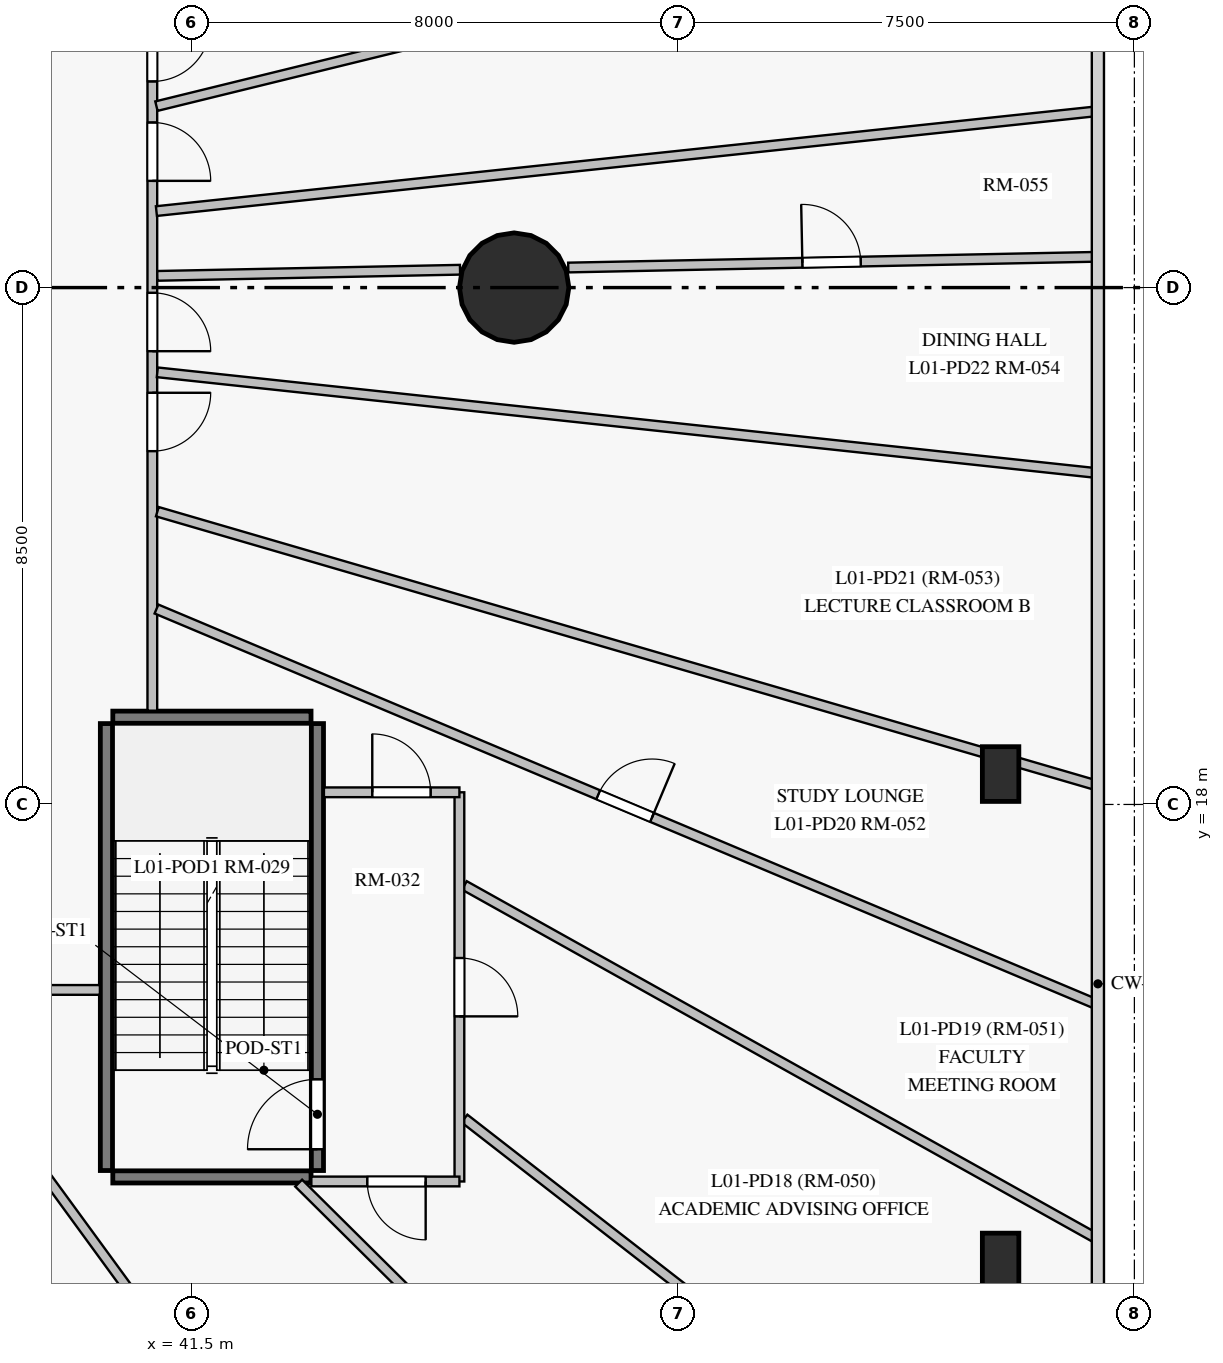
"""IFC4 building model, lengths in metres.
Left out: names, types, materials, properties, quantities, classifications, styles, units other than length and angle.
Written with IfcOpenShell. Run it as: python <this file> out.ifc"""

import sys

from ifc_helpers import new_model, si_unit, direction, frame, frame_2d, origin, origin_with_axes, origin_2d, place, context, subcontext, project, spatial, rectangle, circle, extrude, source, transform, mapped, element, fill, save


model = new_model("IFC4")
c1 = context("Model", 3, precision=1e-05, world=origin(), true_north=direction((0.0, 1.0)))
c2 = subcontext(c1, "Body", "Model", "MODEL_VIEW")
j1 = project(units=[si_unit("LENGTHUNIT", "METRE"), si_unit("PLANEANGLEUNIT", "RADIAN")], contexts=[c1])
p1 = place(None, origin())
s1 = spatial("IfcSite", under=j1, at=p1, CompositionType="ELEMENT")
p2 = place(p1, origin())
s2 = spatial("IfcBuilding", under=s1, at=p2, CompositionType="ELEMENT")
p3 = place(p2, frame((0.0, 0.0, 4.5)))
s3 = spatial("IfcBuildingStorey", under=s2, at=p3, CompositionType="ELEMENT", Elevation=4.5)
m1 = source(origin_with_axes(), c2, "Body", "SweptSolid", [
    extrude(circle(Radius=0.9, at=origin_2d()), origin(), (0.0, 0.0, 1.0), 4.5),
])
p4 = place(p3, frame((46.8, 26.5, 0.0), z_axis=(0.0, 0.0, 1.0), x_axis=(1.0, 0.0, 0.0)))
e1 = element("IfcColumn", 1, at=p4, inside=s3, PredefinedType="COLUMN", context=c2, shape_type="MappedRepresentation", body=[
    mapped(m1, transform((0.0, 0.0, 0.0), scale=1.0)),
])
m2 = source(origin_with_axes(), c2, "Body", "SweptSolid", [
    extrude(rectangle(XDim=0.6, YDim=0.9, at=origin_2d()), origin(), (0.0, 0.0, 1.0), 4.5),
])
for number, where, z_axis, x_axis in (
    (2, (54.8, 10.5, 0.0), (0.0, 0.0, 1.0), (1.0, 0.0, 0.0)),
    (3, (54.8, 18.5, 0.0), (0.0, 0.0, 1.0), (1.0, 0.0, 0.0)),
):
    element("IfcColumn", number, at=place(p3, frame(where, z_axis=z_axis, x_axis=x_axis)), inside=s3, PredefinedType="PILASTER", context=c2, shape_type="MappedRepresentation", body=[
        mapped(m2, transform((0.0, 0.0, 0.0), scale=1.0)),
    ])
p5 = place(p3, frame((40.095, 11.98, 0.0), z_axis=(0.0, 0.0, 1.0), x_axis=(0.0, 1.0, 0.0)))
e4 = element("IfcWall", 4, at=p5, inside=s3, PredefinedType="SHEAR", context=c2, shape_type="SweptSolid", body=[
    extrude(rectangle(XDim=7.35, YDim=0.2, at=frame_2d((3.675, 0.0))), origin(), (0.0, 0.0, 1.0), 4.2),
])
p6 = place(p3, frame((43.565, 11.98, 0.0), z_axis=(0.0, 0.0, 1.0), x_axis=(0.0, 1.0, 0.0)))
e5 = element("IfcWall", 5, at=p6, inside=s3, PredefinedType="SHEAR", context=c2, shape_type="SweptSolid", body=[
    extrude(rectangle(XDim=7.35, YDim=0.2, at=frame_2d((3.675, 0.0))), origin(), (0.0, 0.0, 1.0), 4.2),
])
p7 = place(p6, frame((0.35, 0.0, 0.0)))
e6 = element("IfcOpeningElement", 6, at=p7, cuts=e5, PredefinedType="OPENING", context=c2, shape_type="SweptSolid", body=[
    extrude(rectangle(XDim=1.15, YDim=2.15, at=frame_2d((0.575, 1.075))), frame((0.0, 0.11, 0.0), z_axis=(0.0, -1.0, 0.0), x_axis=(1.0, 0.0, 0.0)), (0.0, 0.0, 1.0), 0.22),
])
for number, where, z_axis, x_axis in (
    (7, (40.2, 11.875, 0.0), (0.0, 0.0, 1.0), (1.0, 0.0, 0.0)),
    (8, (40.2, 19.435, 0.0), (0.0, 0.0, 1.0), (1.0, 0.0, 0.0)),
):
    element("IfcWall", number, at=place(p3, frame(where, z_axis=z_axis, x_axis=x_axis)), inside=s3, PredefinedType="SHEAR", context=c2, shape_type="SweptSolid", body=[
        extrude(rectangle(XDim=3.26, YDim=0.2, at=frame_2d((1.63, 0.0))), origin(), (0.0, 0.0, 1.0), 4.2),
    ])
p8 = place(p3, frame((40.85, 38.05, 0.0), z_axis=(0.0, 0.0, 1.0), x_axis=(0.0, -1.0, 0.0)))
e9 = element("IfcWall", 9, at=p8, inside=s3, PredefinedType="PARTITIONING", context=c2, shape_type="SweptSolid", body=[
    extrude(rectangle(XDim=18.508, YDim=0.16, at=frame_2d((9.254, 0.0))), origin(), (0.0, 0.0, 1.0), 3.25),
])
p9 = place(p8, frame((13.28, 0.0, 0.0)))
e10 = element("IfcOpeningElement", 10, at=p9, cuts=e9, PredefinedType="OPENING", context=c2, shape_type="SweptSolid", body=[
    extrude(rectangle(XDim=0.96, YDim=2.15, at=frame_2d((0.48, 1.075))), frame((0.0, 0.09, 0.0), z_axis=(0.0, -1.0, 0.0), x_axis=(1.0, 0.0, 0.0)), (0.0, 0.0, 1.0), 0.18),
])
p10 = place(p8, frame((11.636, 0.0, 0.0)))
e11 = element("IfcOpeningElement", 11, at=p10, cuts=e9, PredefinedType="OPENING", context=c2, shape_type="SweptSolid", body=[
    extrude(rectangle(XDim=0.96, YDim=2.15, at=frame_2d((0.48, 1.075))), frame((0.0, 0.09, 0.0), z_axis=(0.0, -1.0, 0.0), x_axis=(1.0, 0.0, 0.0)), (0.0, 0.0, 1.0), 0.18),
])
p11 = place(p8, frame((8.835, 0.0, 0.0)))
e12 = element("IfcOpeningElement", 12, at=p11, cuts=e9, PredefinedType="OPENING", context=c2, shape_type="SweptSolid", body=[
    extrude(rectangle(XDim=0.96, YDim=2.15, at=frame_2d((0.48, 1.075))), frame((0.0, 0.09, 0.0), z_axis=(0.0, -1.0, 0.0), x_axis=(1.0, 0.0, 0.0)), (0.0, 0.0, 1.0), 0.18),
])
p12 = place(p8, frame((6.084, 0.0, 0.0)))
e13 = element("IfcOpeningElement", 13, at=p12, cuts=e9, PredefinedType="OPENING", context=c2, shape_type="SweptSolid", body=[
    extrude(rectangle(XDim=0.96, YDim=2.15, at=frame_2d((0.48, 1.075))), frame((0.0, 0.09, 0.0), z_axis=(0.0, -1.0, 0.0), x_axis=(1.0, 0.0, 0.0)), (0.0, 0.0, 1.0), 0.18),
])
p13 = place(p8, frame((7.2, 0.0, 0.0)))
e14 = element("IfcOpeningElement", 14, at=p13, cuts=e9, PredefinedType="OPENING", context=c2, shape_type="SweptSolid", body=[
    extrude(rectangle(XDim=0.96, YDim=2.15, at=frame_2d((0.48, 1.075))), frame((0.0, 0.09, 0.0), z_axis=(0.0, -1.0, 0.0), x_axis=(1.0, 0.0, 0.0)), (0.0, 0.0, 1.0), 0.18),
])
p14 = place(p8, frame((2.446, 0.0, 0.0)))
e15 = element("IfcOpeningElement", 15, at=p14, cuts=e9, PredefinedType="OPENING", context=c2, shape_type="SweptSolid", body=[
    extrude(rectangle(XDim=0.86, YDim=2.04, at=frame_2d((0.43, 1.02))), frame((0.0, 0.09, 0.0), z_axis=(0.0, -1.0, 0.0), x_axis=(1.0, 0.0, 0.0)), (0.0, 0.0, 1.0), 0.18),
])
p15 = place(p8, frame((1.037, 0.0, 0.0)))
e16 = element("IfcOpeningElement", 16, at=p15, cuts=e9, PredefinedType="OPENING", context=c2, shape_type="SweptSolid", body=[
    extrude(rectangle(XDim=0.86, YDim=2.04, at=frame_2d((0.43, 1.02))), frame((0.0, 0.09, 0.0), z_axis=(0.0, -1.0, 0.0), x_axis=(1.0, 0.0, 0.0)), (0.0, 0.0, 1.0), 0.18),
])
p16 = place(p3, frame((40.918, 21.214, 0.0), z_axis=(0.0, 0.0, 1.0), x_axis=(0.921837584327, -0.387576402947, 0.0)))
e17 = element("IfcWall", 17, at=p16, inside=s3, PredefinedType="PARTITIONING", context=c2, shape_type="SweptSolid", body=[
    extrude(rectangle(XDim=16.762, YDim=0.16, at=frame_2d((8.381, 0.0))), origin(), (0.0, 0.0, 1.0), 4.2),
])
p17 = place(p16, frame((7.881, 0.0, 0.0)))
e18 = element("IfcOpeningElement", 18, at=p17, cuts=e17, PredefinedType="OPENING", context=c2, shape_type="SweptSolid", body=[
    extrude(rectangle(XDim=0.96, YDim=2.15, at=frame_2d((0.48, 1.075))), frame((0.0, 0.09, 0.0), z_axis=(0.0, -1.0, 0.0), x_axis=(1.0, 0.0, 0.0)), (0.0, 0.0, 1.0), 0.18),
])
p18 = place(p3, frame((40.932, 22.815, 0.0), z_axis=(0.0, 0.0, 1.0), x_axis=(0.960065941078, -0.279773817185, 0.0)))
e19 = element("IfcWall", 19, at=p18, inside=s3, PredefinedType="PARTITIONING", context=c2, shape_type="SweptSolid", body=[
    extrude(rectangle(XDim=16.083, YDim=0.16, at=frame_2d((8.042, 0.0))), origin(), (0.0, 0.0, 1.0), 3.7),
])
p19 = place(p3, frame((40.917, 29.484, 0.0), z_axis=(0.0, 0.0, 1.0), x_axis=(0.97121044227, 0.238223166012, 0.0)))
e20 = element("IfcWall", 20, at=p19, inside=s3, PredefinedType="PARTITIONING", context=c2, shape_type="SweptSolid", body=[
    extrude(rectangle(XDim=15.914, YDim=0.16, at=frame_2d((7.957, 0.0))), origin(), (0.0, 0.0, 1.0), 3.7),
])
p20 = place(p3, frame((40.932, 25.107, 0.0), z_axis=(0.0, 0.0, 1.0), x_axis=(0.994299337465, -0.106624704062, 0.0)))
e21 = element("IfcWall", 21, at=p20, inside=s3, PredefinedType="PARTITIONING", context=c2, shape_type="SweptSolid", body=[
    extrude(rectangle(XDim=15.531, YDim=0.16, at=frame_2d((7.766, 0.0))), origin(), (0.0, 0.0, 1.0), 3.7),
])
p21 = place(p3, frame((40.917, 27.758, 0.0), z_axis=(0.0, 0.0, 1.0), x_axis=(0.994413071603, 0.10555871838, 0.0)))
e22 = element("IfcWall", 22, at=p21, inside=s3, PredefinedType="PARTITIONING", context=c2, shape_type="SweptSolid", body=[
    extrude(rectangle(XDim=15.545, YDim=0.16, at=frame_2d((7.772, 0.0))), origin(), (0.0, 0.0, 1.0), 3.7),
])
p22 = place(p3, frame((36.923, 14.868, 0.0), z_axis=(0.0, 0.0, 1.0), x_axis=(0.589855025389, -0.80750916343, 0.0)))
e23 = element("IfcWall", 23, at=p22, inside=s3, PredefinedType="PARTITIONING", context=c2, shape_type="SweptSolid", body=[
    extrude(rectangle(XDim=15.27, YDim=0.16, at=frame_2d((7.635, 0.0))), origin(), (0.0, 0.0, 1.0), 4.2),
])
p23 = place(p22, frame((7.142, 0.0, 0.0)))
e24 = element("IfcOpeningElement", 24, at=p23, cuts=e23, PredefinedType="OPENING", context=c2, shape_type="SweptSolid", body=[
    extrude(rectangle(XDim=0.96, YDim=2.15, at=frame_2d((0.48, 1.075))), frame((0.0, 0.09, 0.0), z_axis=(0.0, -1.0, 0.0), x_axis=(1.0, 0.0, 0.0)), (0.0, 0.0, 1.0), 0.18),
])
p24 = place(p3, frame((35.674, 14.868, 0.0), z_axis=(0.0, 0.0, 1.0), x_axis=(0.528650980247, -0.848839290492, 0.0)))
e25 = element("IfcWall", 25, at=p24, inside=s3, PredefinedType="PARTITIONING", context=c2, shape_type="SweptSolid", body=[
    extrude(rectangle(XDim=14.529, YDim=0.16, at=frame_2d((7.265, 0.0))), origin(), (0.0, 0.0, 1.0), 4.2),
])
p25 = place(p24, frame((6.835, 0.0, 0.0)))
e26 = element("IfcOpeningElement", 26, at=p25, cuts=e25, PredefinedType="OPENING", context=c2, shape_type="SweptSolid", body=[
    extrude(rectangle(XDim=0.86, YDim=2.04, at=frame_2d((0.43, 1.02))), frame((0.0, 0.09, 0.0), z_axis=(0.0, -1.0, 0.0), x_axis=(1.0, 0.0, 0.0)), (0.0, 0.0, 1.0), 0.18),
])
p26 = place(p3, frame((39.988, 14.95, 0.0), z_axis=(0.0, 0.0, 1.0), x_axis=(-1.0, 0.0, 0.0)))
e27 = element("IfcWall", 27, at=p26, inside=s3, PredefinedType="PARTITIONING", context=c2, shape_type="SweptSolid", body=[
    extrude(rectangle(XDim=14.588, YDim=0.16, at=frame_2d((7.294, 0.0))), origin(), (0.0, 0.0, 1.0), 4.2),
])
p27 = place(p26, frame((10.34, 0.0, 0.0)))
e28 = element("IfcOpeningElement", 28, at=p27, cuts=e27, PredefinedType="OPENING", context=c2, shape_type="SweptSolid", body=[
    extrude(rectangle(XDim=0.96, YDim=2.15, at=frame_2d((0.48, 1.075))), frame((0.0, 0.09, 0.0), z_axis=(0.0, -1.0, 0.0), x_axis=(1.0, 0.0, 0.0)), (0.0, 0.0, 1.0), 0.18),
])
p28 = place(p26, frame((7.808, 0.0, 0.0)))
e29 = element("IfcOpeningElement", 29, at=p28, cuts=e27, PredefinedType="OPENING", context=c2, shape_type="SweptSolid", body=[
    extrude(rectangle(XDim=0.96, YDim=2.15, at=frame_2d((0.48, 1.075))), frame((0.0, 0.09, 0.0), z_axis=(0.0, -1.0, 0.0), x_axis=(1.0, 0.0, 0.0)), (0.0, 0.0, 1.0), 0.18),
])
p29 = place(p26, frame((6.145, 0.0, 0.0)))
e30 = element("IfcOpeningElement", 30, at=p29, cuts=e27, PredefinedType="OPENING", context=c2, shape_type="SweptSolid", body=[
    extrude(rectangle(XDim=0.96, YDim=2.15, at=frame_2d((0.48, 1.075))), frame((0.0, 0.09, 0.0), z_axis=(0.0, -1.0, 0.0), x_axis=(1.0, 0.0, 0.0)), (0.0, 0.0, 1.0), 0.18),
])
p30 = place(p26, frame((1.482, 0.0, 0.0)))
e31 = element("IfcOpeningElement", 31, at=p30, cuts=e27, PredefinedType="OPENING", context=c2, shape_type="SweptSolid", body=[
    extrude(rectangle(XDim=0.96, YDim=2.15, at=frame_2d((0.48, 1.075))), frame((0.0, 0.09, 0.0), z_axis=(0.0, -1.0, 0.0), x_axis=(1.0, 0.0, 0.0)), (0.0, 0.0, 1.0), 0.18),
])
p31 = place(p26, frame((12.07, 0.0, 0.0)))
e32 = element("IfcOpeningElement", 32, at=p31, cuts=e27, PredefinedType="OPENING", context=c2, shape_type="SweptSolid", body=[
    extrude(rectangle(XDim=0.96, YDim=2.15, at=frame_2d((0.48, 1.075))), frame((0.0, 0.09, 0.0), z_axis=(0.0, -1.0, 0.0), x_axis=(1.0, 0.0, 0.0)), (0.0, 0.0, 1.0), 0.18),
])
p32 = place(p3, frame((34.121, 14.882, 0.0), z_axis=(0.0, 0.0, 1.0), x_axis=(0.439712558425, -0.898138556105, 0.0)))
e33 = element("IfcWall", 33, at=p32, inside=s3, PredefinedType="PARTITIONING", context=c2, shape_type="SweptSolid", body=[
    extrude(rectangle(XDim=13.751, YDim=0.16, at=frame_2d((6.875, 0.0))), origin(), (0.0, 0.0, 1.0), 4.2),
])
p33 = place(p3, frame((45.982, 12.836, 0.0), z_axis=(0.0, 0.0, 1.0), x_axis=(0.789554176815, -0.613680863214, 0.0)))
e34 = element("IfcWall", 34, at=p33, inside=s3, PredefinedType="PARTITIONING", context=c2, shape_type="SweptSolid", body=[
    extrude(rectangle(XDim=13.146, YDim=0.16, at=frame_2d((6.573, 0.0))), origin(), (0.0, 0.0, 1.0), 4.2),
])
p34 = place(p3, frame((45.982, 16.669, 0.0), z_axis=(0.0, 0.0, 1.0), x_axis=(0.873084325339, -0.487569236978, 0.0)))
e35 = element("IfcWall", 35, at=p34, inside=s3, PredefinedType="PARTITIONING", context=c2, shape_type="SweptSolid", body=[
    extrude(rectangle(XDim=11.894, YDim=0.16, at=frame_2d((5.947, 0.0))), origin(), (0.0, 0.0, 1.0), 4.2),
])
p35 = place(p3, frame((47.69, 26.83, 0.0), z_axis=(0.0, 0.0, 1.0), x_axis=(0.999793534886, 0.02031963585, 0.0)))
e36 = element("IfcWall", 36, at=p35, inside=s3, PredefinedType="PARTITIONING", context=c2, shape_type="SweptSolid", body=[
    extrude(rectangle(XDim=8.687, YDim=0.16, at=frame_2d((4.343, 0.0))), origin(), (0.0, 0.0, 1.0), 3.7),
])
p36 = place(p35, frame((3.851, 0.0, 0.0)))
e37 = element("IfcOpeningElement", 37, at=p36, cuts=e36, PredefinedType="OPENING", context=c2, shape_type="SweptSolid", body=[
    extrude(rectangle(XDim=0.96, YDim=2.15, at=frame_2d((0.48, 1.075))), frame((0.0, 0.09, 0.0), z_axis=(0.0, -1.0, 0.0), x_axis=(1.0, 0.0, 0.0)), (0.0, 0.0, 1.0), 0.18),
])
p37 = place(p3, frame((45.9, 18.2, 0.0), z_axis=(0.0, 0.0, 1.0), x_axis=(0.0, -1.0, 0.0)))
e38 = element("IfcWall", 38, at=p37, inside=s3, PredefinedType="PARTITIONING", context=c2, shape_type="SweptSolid", body=[
    extrude(rectangle(XDim=6.4, YDim=0.16, at=frame_2d((3.2, 0.0))), origin(), (0.0, 0.0, 1.0), 4.2),
])
p38 = place(p37, frame((2.725, 0.0, 0.0)))
e39 = element("IfcOpeningElement", 39, at=p38, cuts=e38, PredefinedType="OPENING", context=c2, shape_type="SweptSolid", body=[
    extrude(rectangle(XDim=0.96, YDim=2.15, at=frame_2d((0.48, 1.075))), frame((0.0, 0.09, 0.0), z_axis=(0.0, -1.0, 0.0), x_axis=(1.0, 0.0, 0.0)), (0.0, 0.0, 1.0), 0.18),
])
p39 = place(p3, frame((40.932, 26.692, 0.0), z_axis=(0.0, 0.0, 1.0), x_axis=(0.999793936069, 0.020299886686, 0.0)))
e40 = element("IfcWall", 40, at=p39, inside=s3, PredefinedType="PARTITIONING", context=c2, shape_type="SweptSolid", body=[
    extrude(rectangle(XDim=4.979, YDim=0.16, at=frame_2d((2.49, 0.0))), origin(), (0.0, 0.0, 1.0), 3.25),
])
p40 = place(p3, frame((43.257, 11.773, 0.0), z_axis=(0.0, 0.0, 1.0), x_axis=(0.709846294383, -0.704356613052, 0.0)))
e41 = element("IfcWall", 41, at=p40, inside=s3, PredefinedType="PARTITIONING", context=c2, shape_type="SweptSolid", body=[
    extrude(rectangle(XDim=4.803, YDim=0.16, at=frame_2d((2.401, 0.0))), origin(), (0.0, 0.0, 1.0), 3.25),
])
p41 = place(p3, frame((45.9, 11.8, 0.0), z_axis=(0.0, 0.0, 1.0), x_axis=(-1.0, 0.0, 0.0)))
e42 = element("IfcWall", 42, at=p41, inside=s3, PredefinedType="PARTITIONING", context=c2, shape_type="SweptSolid", body=[
    extrude(rectangle(XDim=2.435, YDim=0.16, at=frame_2d((1.217, 0.0))), origin(), (0.0, 0.0, 1.0), 4.2),
])
p42 = place(p41, frame((0.555, 0.0, 0.0)))
e43 = element("IfcOpeningElement", 43, at=p42, cuts=e42, PredefinedType="OPENING", context=c2, shape_type="SweptSolid", body=[
    extrude(rectangle(XDim=0.96, YDim=2.15, at=frame_2d((0.48, 1.075))), frame((0.0, 0.09, 0.0), z_axis=(0.0, -1.0, 0.0), x_axis=(1.0, 0.0, 0.0)), (0.0, 0.0, 1.0), 0.18),
])
p43 = place(p3, frame((43.672, 18.2, 0.0), z_axis=(0.0, 0.0, 1.0), x_axis=(1.0, 0.0, 0.0)))
e44 = element("IfcWall", 44, at=p43, inside=s3, PredefinedType="PARTITIONING", context=c2, shape_type="SweptSolid", body=[
    extrude(rectangle(XDim=2.228, YDim=0.16, at=frame_2d((1.114, 0.0))), origin(), (0.0, 0.0, 1.0), 4.2),
])
p44 = place(p43, frame((0.795, 0.0, 0.0)))
e45 = element("IfcOpeningElement", 45, at=p44, cuts=e44, PredefinedType="OPENING", context=c2, shape_type="SweptSolid", body=[
    extrude(rectangle(XDim=0.96, YDim=2.15, at=frame_2d((0.48, 1.075))), frame((0.0, 0.09, 0.0), z_axis=(0.0, -1.0, 0.0), x_axis=(1.0, 0.0, 0.0)), (0.0, 0.0, 1.0), 0.18),
])
m3 = source(origin_with_axes(), c2, "Body", "SweptSolid", [
    extrude(rectangle(XDim=1.15, YDim=2.15, at=frame_2d((0.575, 1.075))), frame((0.0, 0.025, 0.0), z_axis=(0.0, -1.0, 0.0), x_axis=(1.0, 0.0, 0.0)), (0.0, 0.0, 1.0), 0.05),
])
p45 = place(p7, origin())
e46 = element("IfcDoor", 46, at=p45, inside=s3, OperationType="SINGLE_SWING_LEFT", PredefinedType="DOOR", context=c2, shape_type="MappedRepresentation", body=[
    mapped(m3, transform((0.0, 0.0, 0.0), scale=1.0)),
])
fill(e6, e46)
m4 = source(origin_with_axes(), c2, "Body", "SweptSolid", [
    extrude(rectangle(XDim=0.96, YDim=2.15, at=frame_2d((0.48, 1.075))), frame((0.0, 0.025, 0.0), z_axis=(0.0, -1.0, 0.0), x_axis=(1.0, 0.0, 0.0)), (0.0, 0.0, 1.0), 0.05),
])
p46 = place(p42, origin())
e47 = element("IfcDoor", 47, at=p46, inside=s3, OperationType="SINGLE_SWING_LEFT", PredefinedType="DOOR", context=c2, shape_type="MappedRepresentation", body=[
    mapped(m4, transform((0.0, 0.0, 0.0), scale=1.0)),
])
fill(e43, e47)
p47 = place(p38, origin())
e48 = element("IfcDoor", 48, at=p47, inside=s3, OperationType="SINGLE_SWING_RIGHT", PredefinedType="DOOR", context=c2, shape_type="MappedRepresentation", body=[
    mapped(m4, transform((0.0, 0.0, 0.0), scale=1.0)),
])
fill(e39, e48)
p48 = place(p44, origin())
e49 = element("IfcDoor", 49, at=p48, inside=s3, OperationType="SINGLE_SWING_LEFT", PredefinedType="DOOR", context=c2, shape_type="MappedRepresentation", body=[
    mapped(m4, transform((0.0, 0.0, 0.0), scale=1.0)),
])
fill(e45, e49)
p49 = place(p17, origin())
e50 = element("IfcDoor", 50, at=p49, inside=s3, OperationType="SINGLE_SWING_RIGHT", PredefinedType="DOOR", context=c2, shape_type="MappedRepresentation", body=[
    mapped(m4, transform((0.0, 0.0, 0.0), scale=1.0)),
])
fill(e18, e50)
p50 = place(p9, origin())
e51 = element("IfcDoor", 51, at=p50, inside=s3, OperationType="SINGLE_SWING_LEFT", PredefinedType="DOOR", context=c2, shape_type="MappedRepresentation", body=[
    mapped(m4, transform((0.0, 0.0, 0.0), scale=1.0)),
])
fill(e10, e51)
p51 = place(p10, origin())
e52 = element("IfcDoor", 52, at=p51, inside=s3, OperationType="SINGLE_SWING_RIGHT", PredefinedType="DOOR", context=c2, shape_type="MappedRepresentation", body=[
    mapped(m4, transform((0.0, 0.0, 0.0), scale=1.0)),
])
fill(e11, e52)
p52 = place(p36, origin())
e53 = element("IfcDoor", 53, at=p52, inside=s3, OperationType="SINGLE_SWING_LEFT", PredefinedType="DOOR", context=c2, shape_type="MappedRepresentation", body=[
    mapped(m4, transform((0.0, 0.0, 0.0), scale=1.0)),
])
fill(e37, e53)
p53 = place(p11, origin())
e54 = element("IfcDoor", 54, at=p53, inside=s3, OperationType="SINGLE_SWING_RIGHT", PredefinedType="DOOR", context=c2, shape_type="MappedRepresentation", body=[
    mapped(m4, transform((0.0, 0.0, 0.0), scale=1.0)),
])
fill(e12, e54)
p54 = place(p13, origin())
e55 = element("IfcDoor", 55, at=p54, inside=s3, OperationType="SINGLE_SWING_LEFT", PredefinedType="DOOR", context=c2, shape_type="MappedRepresentation", body=[
    mapped(m4, transform((0.0, 0.0, 0.0), scale=1.0)),
])
fill(e14, e55)
save(model, sys.argv[1])
